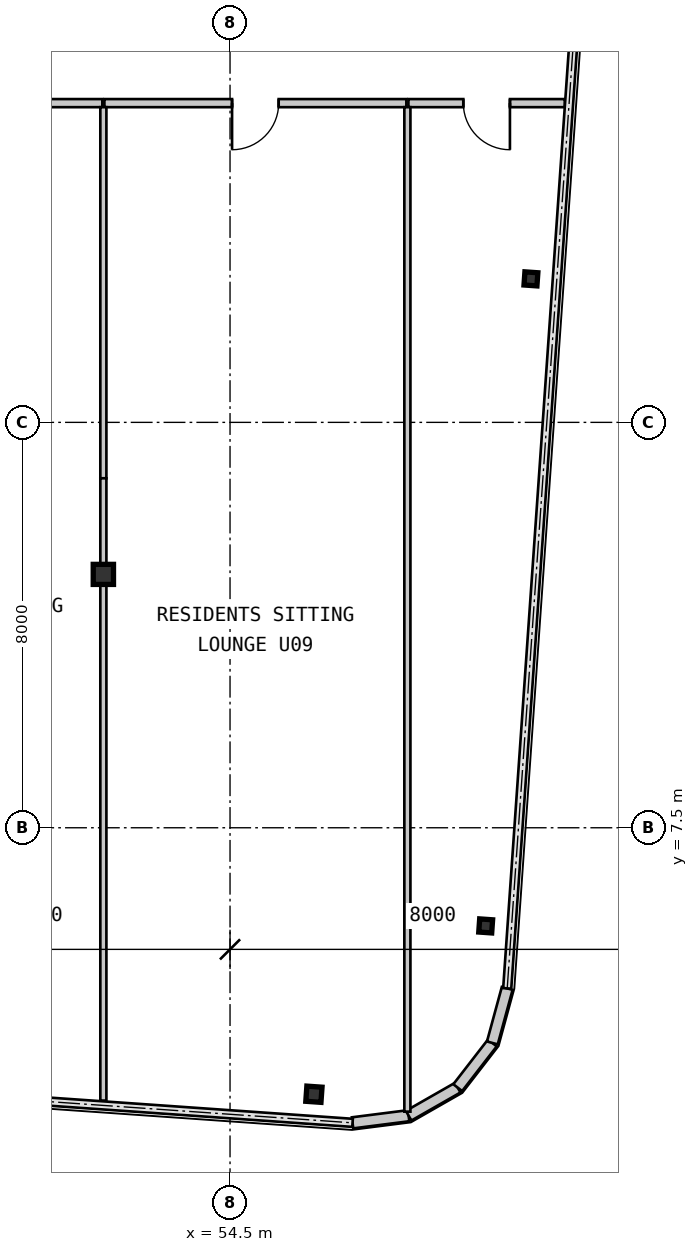
"""IFC4 building model, lengths in metres.
Left out: names, types, materials, properties, quantities, classifications, styles, units other than length and angle.
Written with IfcOpenShell. Run it as: python <this file> out.ifc"""

import sys

from ifc_helpers import new_model, si_unit, direction, frame, frame_2d, origin, origin_2d, place, context, subcontext, project, spatial, rectangle, hollow_rectangle, i_section, extrude, source, transform, mapped, element, fill, save


model = new_model("IFC4")
c1 = context("Model", 3, precision=1e-05, world=origin(), true_north=direction((0.0, 1.0)))
c2 = subcontext(c1, "Body", "Model", "MODEL_VIEW")
j1 = project(units=[si_unit("LENGTHUNIT", "METRE"), si_unit("PLANEANGLEUNIT", "RADIAN")], contexts=[c1])
p1 = place(None, origin())
s1 = spatial("IfcSite", under=j1, at=p1, CompositionType="ELEMENT")
p2 = place(p1, origin())
s2 = spatial("IfcBuilding", under=s1, at=p2, CompositionType="ELEMENT")
p3 = place(p2, frame((0.0, 0.0, 120.4)))
s3 = spatial("IfcBuildingStorey", under=s2, at=p3, CompositionType="ELEMENT", Elevation=120.4)
m1 = source(origin(), c2, "Body", "SweptSolid", [
    extrude(i_section(OverallWidth=0.4, OverallDepth=0.396, WebThickness=0.022, FlangeThickness=0.034, at=origin_2d()), origin(), (0.0, 0.0, 1.0), 3.15),
])
p4 = place(p3, frame((52.0, 12.5, 0.0), z_axis=(0.0, 0.0, 1.0), x_axis=(1.0, 0.0, 0.0)))
e1 = element("IfcColumn", 1, at=p4, inside=s3, PredefinedType="COLUMN", context=c2, shape_type="MappedRepresentation", body=[
    mapped(m1, transform((0.0, 0.0, 0.0), scale=1.0)),
])
m2 = source(origin(), c2, "Body", "SweptSolid", [
    extrude(hollow_rectangle(XDim=0.3, YDim=0.3, WallThickness=0.012, at=origin_2d()), origin(), (0.0, 0.0, 1.0), 3.15),
])
p5 = place(p3, frame((56.156, 2.241, 0.0), z_axis=(0.0, 0.0, 1.0), x_axis=(0.99756405026, -0.069756473744, 0.0)))
e2 = element("IfcColumn", 2, at=p5, inside=s3, PredefinedType="COLUMN", context=c2, shape_type="MappedRepresentation", body=[
    mapped(m2, transform((0.0, 0.0, 0.0), scale=1.0)),
])
m3 = source(origin(), c2, "Body", "SweptSolid", [
    extrude(i_section(OverallWidth=0.256, OverallDepth=0.26, WebThickness=0.01, FlangeThickness=0.017, at=origin_2d()), origin(), (0.0, 0.0, 1.0), 3.15),
])
for number, where, z_axis, x_axis in (
    (3, (59.545, 5.563, 0.0), (0.0, 0.0, 1.0), (0.998, -0.07, 0.0)),
    (4, (60.438, 18.332, 0.0), (0.0, 0.0, 1.0), (0.998, -0.07, 0.0)),
):
    element("IfcColumn", number, at=place(p3, frame(where, z_axis=z_axis, x_axis=x_axis)), inside=s3, PredefinedType="COLUMN", context=c2, shape_type="MappedRepresentation", body=[
        mapped(m3, transform((0.0, 0.0, 0.0), scale=1.0)),
    ])
m4 = source(origin(), c2, "Body", "SweptSolid", [
    extrude(rectangle(XDim=1.116, YDim=0.22, at=frame_2d((0.558, 0.0))), origin(), (0.0, 0.0, 1.0), 2.93),
])
p6 = place(p3, frame((56.918, 1.677, 0.0), z_axis=(0.0, 0.0, 1.0), x_axis=(0.99202678349, 0.126027222605, 0.0)))
e5 = element("IfcWall", 5, at=p6, inside=s3, PredefinedType="SOLIDWALL", context=c2, shape_type="MappedRepresentation", body=[
    mapped(m4, transform((0.0, 0.0, 0.0), scale=1.0)),
])
m5 = source(origin(), c2, "Body", "SweptSolid", [
    extrude(rectangle(XDim=1.116, YDim=0.22, at=frame_2d((0.558, 0.0))), origin(), (0.0, 0.0, 1.0), 2.93),
])
for number, where, z_axis, x_axis in (
    (6, (58.025, 1.817, 0.0), (0.0, 0.0, 1.0), (0.868, 0.496, 0.0)),
    (7, (58.994, 2.371, 0.0), (0.0, 0.0, 1.0), (0.612, 0.791, 0.0)),
    (8, (59.677, 3.254, 0.0), (0.0, 0.0, 1.0), (0.263, 0.965, 0.0)),
):
    element("IfcWall", number, at=place(p3, frame(where, z_axis=z_axis, x_axis=x_axis)), inside=s3, PredefinedType="SOLIDWALL", context=c2, shape_type="MappedRepresentation", body=[
        mapped(m5, transform((0.0, 0.0, 0.0), scale=1.0)),
    ])
m6 = source(origin(), c2, "Body", "SweptSolid", [
    extrude(rectangle(XDim=5.459, YDim=0.16, at=frame_2d((2.73, 0.0))), origin(), (0.0, 0.0, 1.0), 2.93),
])
p7 = place(p3, frame((51.98, 21.8, 0.0), z_axis=(0.0, 0.0, 1.0), x_axis=(-1.0, 0.0, 0.0)))
e9 = element("IfcWall", 9, at=p7, inside=s3, PredefinedType="PARTITIONING", context=c2, shape_type="MappedRepresentation", body=[
    mapped(m6, transform((0.0, 0.0, 0.0), scale=1.0)),
])
m7 = source(origin(), c2, "Body", "SweptSolid", [
    extrude(rectangle(XDim=0.92, YDim=2.1, at=frame_2d((0.46, 1.05))), frame((0.0, 0.09, 0.0), z_axis=(0.0, -1.0, 0.0), x_axis=(1.0, 0.0, 0.0)), (0.0, 0.0, 1.0), 0.18),
])
p8 = place(p7, frame((2.27, 0.0, 0.0)))
e10 = element("IfcOpeningElement", 10, at=p8, cuts=e9, PredefinedType="OPENING", context=c2, shape_type="MappedRepresentation", body=[
    mapped(m7, transform((0.0, 0.0, 0.0), scale=1.0)),
])
m8 = source(origin(), c2, "Body", "SweptSolid", [
    extrude(rectangle(XDim=5.959, YDim=0.16, at=frame_2d((2.98, 0.0))), origin(), (0.0, 0.0, 1.0), 2.93),
])
p9 = place(p3, frame((57.98, 21.8, 0.0), z_axis=(0.0, 0.0, 1.0), x_axis=(-1.0, 0.0, 0.0)))
e11 = element("IfcWall", 11, at=p9, inside=s3, PredefinedType="PARTITIONING", context=c2, shape_type="MappedRepresentation", body=[
    mapped(m8, transform((0.0, 0.0, 0.0), scale=1.0)),
])
p10 = place(p9, frame((2.52, 0.0, 0.0)))
e12 = element("IfcOpeningElement", 12, at=p10, cuts=e11, PredefinedType="OPENING", context=c2, shape_type="MappedRepresentation", body=[
    mapped(m7, transform((0.0, 0.0, 0.0), scale=1.0)),
])
m9 = source(origin(), c2, "Body", "SweptSolid", [
    extrude(rectangle(XDim=3.087, YDim=0.16, at=frame_2d((1.543, 0.0))), origin(), (0.0, 0.0, 1.0), 2.93),
])
p11 = place(p3, frame((61.107, 21.8, 0.0), z_axis=(0.0, 0.0, 1.0), x_axis=(-1.0, 0.0, 0.0)))
e13 = element("IfcWall", 13, at=p11, inside=s3, PredefinedType="PARTITIONING", context=c2, shape_type="MappedRepresentation", body=[
    mapped(m9, transform((0.0, 0.0, 0.0), scale=1.0)),
])
p12 = place(p11, frame((1.083, 0.0, 0.0)))
e14 = element("IfcOpeningElement", 14, at=p12, cuts=e13, PredefinedType="OPENING", context=c2, shape_type="MappedRepresentation", body=[
    mapped(m7, transform((0.0, 0.0, 0.0), scale=1.0)),
])
m10 = source(origin(), c2, "Body", "SweptSolid", [
    extrude(rectangle(XDim=7.324, YDim=0.12, at=frame_2d((3.662, 0.0))), origin(), (0.0, 0.0, 1.0), 2.93),
])
p13 = place(p3, frame((52.0, 21.72, 0.0), z_axis=(0.0, 0.0, 1.0), x_axis=(0.0, -1.0, 0.0)))
e15 = element("IfcWall", 15, at=p13, inside=s3, PredefinedType="PARTITIONING", context=c2, shape_type="MappedRepresentation", body=[
    mapped(m10, transform((0.0, 0.0, 0.0), scale=1.0)),
])
m11 = source(origin(), c2, "Body", "SweptSolid", [
    extrude(rectangle(XDim=1.901, YDim=0.12, at=frame_2d((0.951, 0.0))), origin(), (0.0, 0.0, 1.0), 2.397),
])
p14 = place(p3, frame((52.0, 14.396, 0.0), z_axis=(0.0, 0.0, 1.0), x_axis=(0.0, -1.0, 0.0)))
e16 = element("IfcWall", 16, at=p14, inside=s3, PredefinedType="PARTITIONING", context=c2, shape_type="MappedRepresentation", body=[
    mapped(m11, transform((0.0, 0.0, 0.0), scale=1.0)),
])
m12 = source(origin(), c2, "Body", "SweptSolid", [
    extrude(rectangle(XDim=10.378, YDim=0.12, at=frame_2d((5.189, 0.0))), origin(), (0.0, 0.0, 1.0), 2.93),
])
p15 = place(p3, frame((52.0, 12.495, 0.0), z_axis=(0.0, 0.0, 1.0), x_axis=(0.0, -1.0, 0.0)))
e17 = element("IfcWall", 17, at=p15, inside=s3, PredefinedType="PARTITIONING", context=c2, shape_type="MappedRepresentation", body=[
    mapped(m12, transform((0.0, 0.0, 0.0), scale=1.0)),
])
m13 = source(origin(), c2, "Body", "SweptSolid", [
    extrude(rectangle(XDim=19.822, YDim=0.12, at=frame_2d((9.911, 0.0))), origin(), (0.0, 0.0, 1.0), 2.93),
])
p16 = place(p3, frame((58.0, 21.72, 0.0), z_axis=(0.0, 0.0, 1.0), x_axis=(0.0, -1.0, 0.0)))
e18 = element("IfcWall", 18, at=p16, inside=s3, PredefinedType="PARTITIONING", context=c2, shape_type="MappedRepresentation", body=[
    mapped(m13, transform((0.0, 0.0, 0.0), scale=1.0)),
])
m14 = source(origin(), c2, "Body", "SweptSolid", [
    extrude(rectangle(XDim=0.92, YDim=2.1, at=frame_2d((0.46, 1.05))), frame((0.0, 0.025, 0.0), z_axis=(0.0, -1.0, 0.0), x_axis=(1.0, 0.0, 0.0)), (0.0, 0.0, 1.0), 0.05),
])
p17 = place(p10, origin())
e19 = element("IfcDoor", 19, at=p17, inside=s3, OperationType="SINGLE_SWING_RIGHT", PredefinedType="DOOR", context=c2, shape_type="MappedRepresentation", body=[
    mapped(m14, transform((0.0, 0.0, 0.0), scale=1.0)),
])
fill(e12, e19)
p18 = place(p12, origin())
e20 = element("IfcDoor", 20, at=p18, inside=s3, OperationType="SINGLE_SWING_LEFT", PredefinedType="DOOR", context=c2, shape_type="MappedRepresentation", body=[
    mapped(m14, transform((0.0, 0.0, 0.0), scale=1.0)),
])
fill(e14, e20)
save(model, sys.argv[1])
